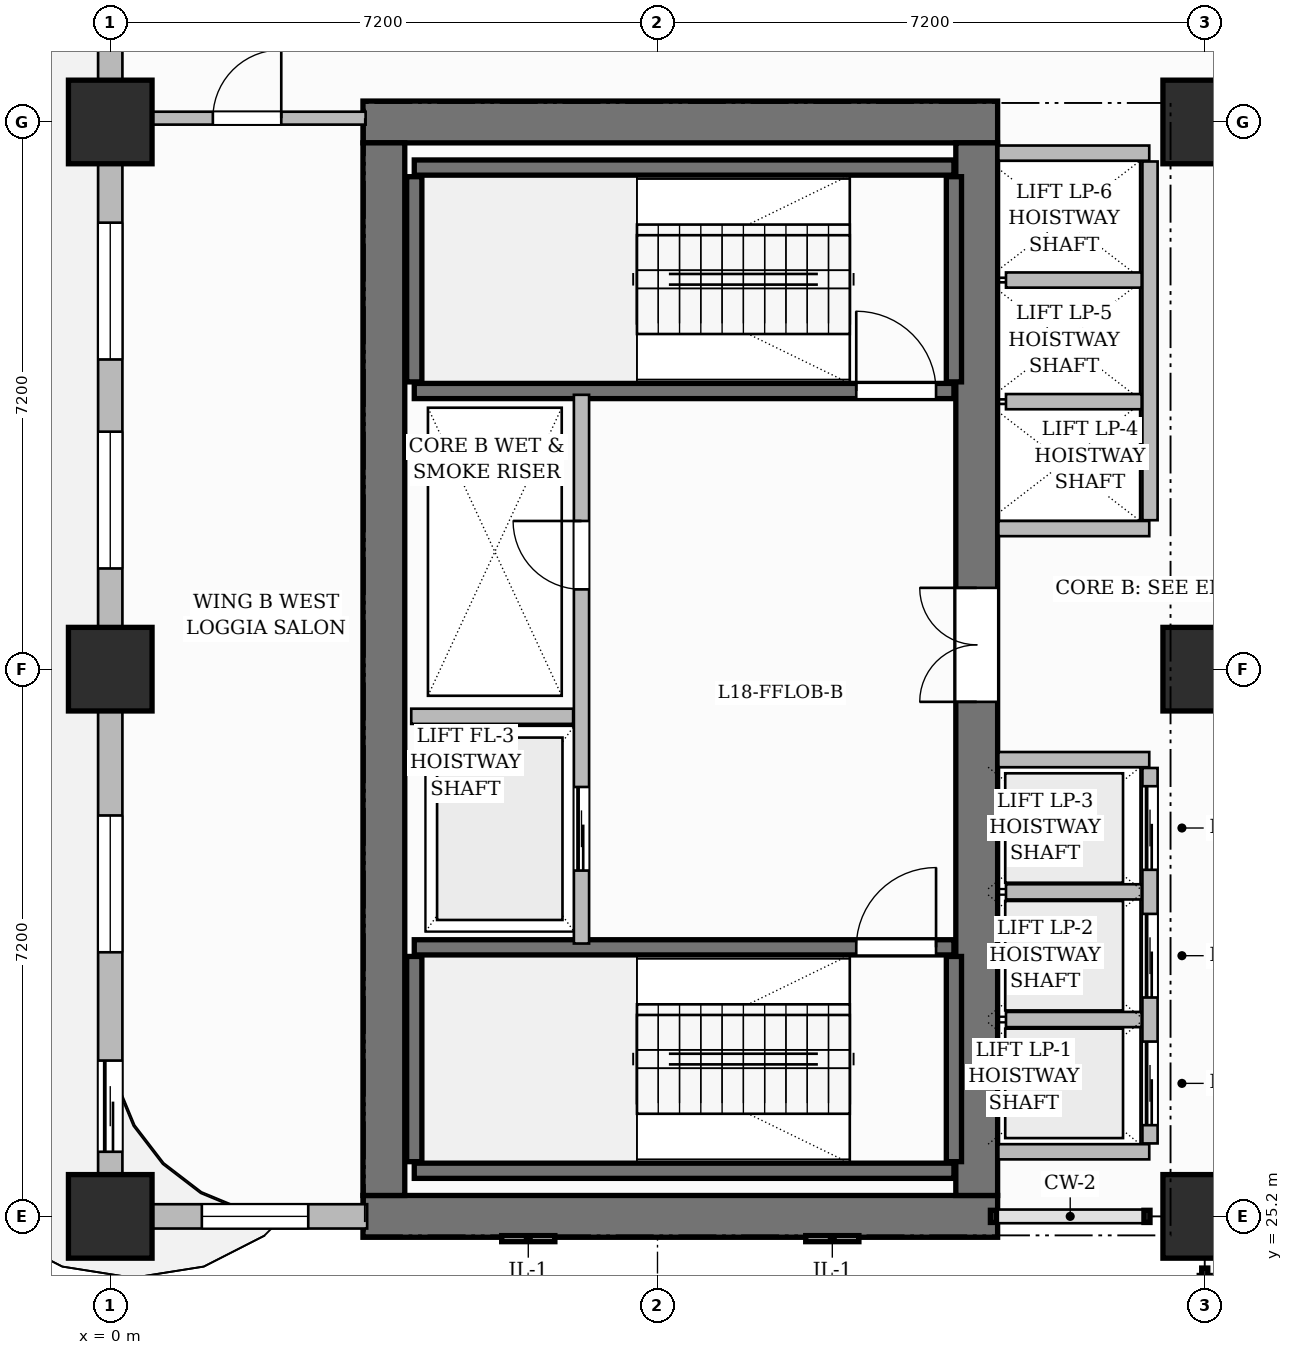
"""IFC4 building model, lengths in metres.
Left out: names, types, materials, properties, quantities, classifications, styles, units other than length and angle.
Written with IfcOpenShell. Run it as: python <this file> out.ifc"""

import sys

from ifc_helpers import new_model, si_unit, direction, frame, frame_2d, origin, origin_2d, place, context, subcontext, project, spatial, rectangle, extrude, source, transform, mapped, element, fill, save


model = new_model("IFC4")
c1 = context("Model", 3, precision=1e-05, world=origin(), true_north=direction((0.0, 1.0)))
c2 = subcontext(c1, "Body", "Model", "MODEL_VIEW")
j1 = project(units=[si_unit("LENGTHUNIT", "METRE"), si_unit("PLANEANGLEUNIT", "RADIAN")], contexts=[c1])
p1 = place(None, origin())
s1 = spatial("IfcSite", under=j1, at=p1, CompositionType="ELEMENT")
p2 = place(p1, origin())
s2 = spatial("IfcBuilding", under=s1, at=p2, CompositionType="ELEMENT")
p3 = place(p2, frame((0.0, 0.0, 76.8)))
s3 = spatial("IfcBuildingStorey", under=s2, at=p3, CompositionType="ELEMENT", Elevation=76.8)
for number, where, z_axis, x_axis in (
    (1, (3.325, 25.2, 0.0), (0.0, 0.0, 1.0), (1.0, 0.0, 0.0)),
    (2, (3.325, 39.6, 0.0), (0.0, 0.0, 1.0), (1.0, 0.0, 0.0)),
):
    element("IfcWall", number, at=place(p3, frame(where, z_axis=z_axis, x_axis=x_axis)), inside=s3, PredefinedType="SHEAR", context=c2, shape_type="SweptSolid", body=[
        extrude(rectangle(XDim=8.35, YDim=0.55, at=frame_2d((4.175, 0.0))), origin(), (0.0, 0.0, 1.0), 3.7),
    ])
p4 = place(p3, frame((3.6, 25.475, 0.0), z_axis=(0.0, 0.0, 1.0), x_axis=(0.0, 1.0, 0.0)))
e3 = element("IfcWall", 3, at=p4, inside=s3, PredefinedType="SHEAR", context=c2, shape_type="SweptSolid", body=[
    extrude(rectangle(XDim=13.85, YDim=0.55, at=frame_2d((6.925, 0.0))), origin(), (0.0, 0.0, 1.0), 3.7),
])
p5 = place(p3, frame((11.4, 25.475, 0.0), z_axis=(0.0, 0.0, 1.0), x_axis=(0.0, 1.0, 0.0)))
e4 = element("IfcWall", 4, at=p5, inside=s3, PredefinedType="SHEAR", context=c2, shape_type="SweptSolid", body=[
    extrude(rectangle(XDim=13.85, YDim=0.55, at=frame_2d((6.925, 0.0))), origin(), (0.0, 0.0, 1.0), 3.7),
])
p6 = place(p5, frame((6.495, 0.0, 0.0)))
e5 = element("IfcOpeningElement", 5, at=p6, cuts=e4, PredefinedType="OPENING", context=c2, shape_type="SweptSolid", body=[
    extrude(rectangle(XDim=1.5, YDim=2.2, at=frame_2d((0.75, 1.1))), frame((0.0, 0.285, 0.0), z_axis=(0.0, -1.0, 0.0), x_axis=(1.0, 0.0, 0.0)), (0.0, 0.0, 1.0), 0.57),
])
m1 = source(origin(), c2, "Body", "SweptSolid", [
    extrude(rectangle(XDim=1.1, YDim=1.1, at=origin_2d()), origin(), (0.0, 0.0, 1.0), 3.7),
])
for number, where, z_axis, x_axis in (
    (6, (0.0, 25.2, 0.0), (0.0, 0.0, 1.0), (1.0, 0.0, 0.0)),
    (7, (0.0, 32.4, 0.0), (0.0, 0.0, 1.0), (1.0, 0.0, 0.0)),
    (8, (0.0, 39.6, 0.0), (0.0, 0.0, 1.0), (1.0, 0.0, 0.0)),
    (9, (14.4, 25.2, 0.0), (0.0, 0.0, 1.0), (1.0, 0.0, 0.0)),
    (10, (14.4, 32.4, 0.0), (0.0, 0.0, 1.0), (1.0, 0.0, 0.0)),
    (11, (14.4, 39.6, 0.0), (0.0, 0.0, 1.0), (1.0, 0.0, 0.0)),
):
    element("IfcColumn", number, at=place(p3, frame(where, z_axis=z_axis, x_axis=x_axis)), inside=s3, PredefinedType="COLUMN", context=c2, shape_type="MappedRepresentation", body=[
        mapped(m1, transform((0.0, 0.0, 0.0), scale=1.0)),
    ])
p7 = place(p3, frame((4.0, 25.8, 0.0), z_axis=(0.0, 0.0, 1.0), x_axis=(1.0, 0.0, 0.0)))
e12 = element("IfcWall", 12, at=p7, inside=s3, PredefinedType="SHEAR", context=c2, shape_type="SweptSolid", body=[
    extrude(rectangle(XDim=7.1, YDim=0.2, at=frame_2d((3.55, 0.0))), origin(), (0.0, 0.0, 1.0), 3.7),
])
for number, where, z_axis, x_axis in (
    (13, (4.0, 25.92, 0.0), (0.0, 0.0, 1.0), (0.0, 1.0, 0.0)),
    (14, (11.1, 25.92, 0.0), (0.0, 0.0, 1.0), (0.0, 1.0, 0.0)),
):
    element("IfcWall", number, at=place(p3, frame(where, z_axis=z_axis, x_axis=x_axis)), inside=s3, PredefinedType="SHEAR", context=c2, shape_type="SweptSolid", body=[
        extrude(rectangle(XDim=2.7, YDim=0.2, at=frame_2d((1.35, 0.0))), origin(), (0.0, 0.0, 1.0), 3.7),
    ])
p8 = place(p3, frame((4.0, 28.74, 0.0), z_axis=(0.0, 0.0, 1.0), x_axis=(1.0, 0.0, 0.0)))
e15 = element("IfcWall", 15, at=p8, inside=s3, PredefinedType="SHEAR", context=c2, shape_type="SweptSolid", body=[
    extrude(rectangle(XDim=7.1, YDim=0.2, at=frame_2d((3.55, 0.0))), origin(), (0.0, 0.0, 1.0), 3.7),
])
p9 = place(p8, frame((5.815, 0.0, 0.0)))
e16 = element("IfcOpeningElement", 16, at=p9, cuts=e15, PredefinedType="OPENING", context=c2, shape_type="SweptSolid", body=[
    extrude(rectangle(XDim=1.05, YDim=2.2, at=frame_2d((0.525, 1.1))), frame((0.0, 0.11, 0.0), z_axis=(0.0, -1.0, 0.0), x_axis=(1.0, 0.0, 0.0)), (0.0, 0.0, 1.0), 0.22),
])
p10 = place(p3, frame((4.0, 39.0, 0.0), z_axis=(0.0, 0.0, 1.0), x_axis=(1.0, 0.0, 0.0)))
e17 = element("IfcWall", 17, at=p10, inside=s3, PredefinedType="SHEAR", context=c2, shape_type="SweptSolid", body=[
    extrude(rectangle(XDim=7.1, YDim=0.2, at=frame_2d((3.55, 0.0))), origin(), (0.0, 0.0, 1.0), 3.7),
])
for number, where, z_axis, x_axis in (
    (18, (4.0, 36.18, 0.0), (0.0, 0.0, 1.0), (0.0, 1.0, 0.0)),
    (19, (11.1, 36.18, 0.0), (0.0, 0.0, 1.0), (0.0, 1.0, 0.0)),
):
    element("IfcWall", number, at=place(p3, frame(where, z_axis=z_axis, x_axis=x_axis)), inside=s3, PredefinedType="SHEAR", context=c2, shape_type="SweptSolid", body=[
        extrude(rectangle(XDim=2.7, YDim=0.2, at=frame_2d((1.35, 0.0))), origin(), (0.0, 0.0, 1.0), 3.7),
    ])
p11 = place(p3, frame((4.0, 36.06, 0.0), z_axis=(0.0, 0.0, 1.0), x_axis=(1.0, 0.0, 0.0)))
e20 = element("IfcWall", 20, at=p11, inside=s3, PredefinedType="SHEAR", context=c2, shape_type="SweptSolid", body=[
    extrude(rectangle(XDim=7.1, YDim=0.2, at=frame_2d((3.55, 0.0))), origin(), (0.0, 0.0, 1.0), 3.7),
])
p12 = place(p11, frame((5.815, 0.0, 0.0)))
e21 = element("IfcOpeningElement", 21, at=p12, cuts=e20, PredefinedType="OPENING", context=c2, shape_type="SweptSolid", body=[
    extrude(rectangle(XDim=1.05, YDim=2.2, at=frame_2d((0.525, 1.1))), frame((0.0, 0.11, 0.0), z_axis=(0.0, -1.0, 0.0), x_axis=(1.0, 0.0, 0.0)), (0.0, 0.0, 1.0), 0.22),
])
p13 = place(p3, frame((6.2, 28.79, 0.0), z_axis=(0.0, 0.0, 1.0), x_axis=(0.0, 1.0, 0.0)))
e22 = element("IfcWall", 22, at=p13, inside=s3, PredefinedType="PARTITIONING", context=c2, shape_type="SweptSolid", body=[
    extrude(rectangle(XDim=7.22, YDim=0.2, at=frame_2d((3.61, 0.0))), origin(), (0.0, 0.0, 1.0), 3.45),
])
p14 = place(p13, frame((4.66, 0.0, 0.0)))
e23 = element("IfcOpeningElement", 23, at=p14, cuts=e22, PredefinedType="OPENING", context=c2, shape_type="SweptSolid", body=[
    extrude(rectangle(XDim=0.9, YDim=2.1, at=frame_2d((0.45, 1.05))), frame((0.0, 0.11, 0.0), z_axis=(0.0, -1.0, 0.0), x_axis=(1.0, 0.0, 0.0)), (0.0, 0.0, 1.0), 0.22),
])
p15 = place(p13, frame((0.96, 0.0, 0.0)))
e24 = element("IfcOpeningElement", 24, at=p15, cuts=e22, PredefinedType="OPENING", context=c2, shape_type="SweptSolid", body=[
    extrude(rectangle(XDim=1.1, YDim=2.2, at=frame_2d((0.55, 1.1))), frame((0.0, 0.11, 0.0), z_axis=(0.0, -1.0, 0.0), x_axis=(1.0, 0.0, 0.0)), (0.0, 0.0, 1.0), 0.22),
])
p16 = place(p3, frame((3.96, 31.78, 0.0), z_axis=(0.0, 0.0, 1.0), x_axis=(1.0, 0.0, 0.0)))
e25 = element("IfcWall", 25, at=p16, inside=s3, PredefinedType="PARTITIONING", context=c2, shape_type="SweptSolid", body=[
    extrude(rectangle(XDim=2.13, YDim=0.2, at=frame_2d((1.065, 0.0))), origin(), (0.0, 0.0, 1.0), 3.45),
])
for number, where, z_axis, x_axis in (
    (26, (11.685, 26.05, 0.0), (0.0, 0.0, 1.0), (1.0, 0.0, 0.0)),
    (27, (11.685, 31.21, 0.0), (0.0, 0.0, 1.0), (1.0, 0.0, 0.0)),
):
    element("IfcWall", number, at=place(p3, frame(where, z_axis=z_axis, x_axis=x_axis)), inside=s3, PredefinedType="PARTITIONING", context=c2, shape_type="SweptSolid", body=[
        extrude(rectangle(XDim=1.985, YDim=0.2, at=frame_2d((0.992, 0.0))), origin(), (0.0, 0.0, 1.0), 3.45),
    ])
p17 = place(p3, frame((13.68, 26.16, 0.0), z_axis=(0.0, 0.0, 1.0), x_axis=(0.0, 1.0, 0.0)))
e28 = element("IfcWall", 28, at=p17, inside=s3, PredefinedType="PARTITIONING", context=c2, shape_type="SweptSolid", body=[
    extrude(rectangle(XDim=4.94, YDim=0.2, at=frame_2d((2.47, 0.0))), origin(), (0.0, 0.0, 1.0), 3.45),
])
p18 = place(p17, frame((0.24, 0.0, 0.0)))
e29 = element("IfcOpeningElement", 29, at=p18, cuts=e28, PredefinedType="OPENING", context=c2, shape_type="SweptSolid", body=[
    extrude(rectangle(XDim=1.1, YDim=2.2, at=frame_2d((0.55, 1.1))), frame((0.0, 0.11, 0.0), z_axis=(0.0, -1.0, 0.0), x_axis=(1.0, 0.0, 0.0)), (0.0, 0.0, 1.0), 0.22),
])
p19 = place(p17, frame((1.92, 0.0, 0.0)))
e30 = element("IfcOpeningElement", 30, at=p19, cuts=e28, PredefinedType="OPENING", context=c2, shape_type="SweptSolid", body=[
    extrude(rectangle(XDim=1.1, YDim=2.2, at=frame_2d((0.55, 1.1))), frame((0.0, 0.11, 0.0), z_axis=(0.0, -1.0, 0.0), x_axis=(1.0, 0.0, 0.0)), (0.0, 0.0, 1.0), 0.22),
])
p20 = place(p17, frame((3.6, 0.0, 0.0)))
e31 = element("IfcOpeningElement", 31, at=p20, cuts=e28, PredefinedType="OPENING", context=c2, shape_type="SweptSolid", body=[
    extrude(rectangle(XDim=1.1, YDim=2.2, at=frame_2d((0.55, 1.1))), frame((0.0, 0.11, 0.0), z_axis=(0.0, -1.0, 0.0), x_axis=(1.0, 0.0, 0.0)), (0.0, 0.0, 1.0), 0.22),
])
for number, where, z_axis, x_axis in (
    (32, (11.785, 27.79, 0.0), (0.0, 0.0, 1.0), (1.0, 0.0, 0.0)),
    (33, (11.785, 29.47, 0.0), (0.0, 0.0, 1.0), (1.0, 0.0, 0.0)),
):
    element("IfcWall", number, at=place(p3, frame(where, z_axis=z_axis, x_axis=x_axis)), inside=s3, PredefinedType="PARTITIONING", context=c2, shape_type="SweptSolid", body=[
        extrude(rectangle(XDim=1.785, YDim=0.2, at=frame_2d((0.893, 0.0))), origin(), (0.0, 0.0, 1.0), 3.45),
    ])
for number, where, z_axis, x_axis in (
    (34, (11.685, 34.25, 0.0), (0.0, 0.0, 1.0), (1.0, 0.0, 0.0)),
    (35, (11.685, 39.19, 0.0), (0.0, 0.0, 1.0), (1.0, 0.0, 0.0)),
):
    element("IfcWall", number, at=place(p3, frame(where, z_axis=z_axis, x_axis=x_axis)), inside=s3, PredefinedType="PARTITIONING", context=c2, shape_type="SweptSolid", body=[
        extrude(rectangle(XDim=1.985, YDim=0.2, at=frame_2d((0.992, 0.0))), origin(), (0.0, 0.0, 1.0), 3.45),
    ])
p21 = place(p3, frame((13.68, 34.36, 0.0), z_axis=(0.0, 0.0, 1.0), x_axis=(0.0, 1.0, 0.0)))
e36 = element("IfcWall", 36, at=p21, inside=s3, PredefinedType="PARTITIONING", context=c2, shape_type="SweptSolid", body=[
    extrude(rectangle(XDim=4.72, YDim=0.2, at=frame_2d((2.36, 0.0))), origin(), (0.0, 0.0, 1.0), 3.45),
])
for number, where, z_axis, x_axis in (
    (37, (11.785, 35.92, 0.0), (0.0, 0.0, 1.0), (1.0, 0.0, 0.0)),
    (38, (11.785, 37.52, 0.0), (0.0, 0.0, 1.0), (1.0, 0.0, 0.0)),
):
    element("IfcWall", number, at=place(p3, frame(where, z_axis=z_axis, x_axis=x_axis)), inside=s3, PredefinedType="PARTITIONING", context=c2, shape_type="SweptSolid", body=[
        extrude(rectangle(XDim=1.785, YDim=0.2, at=frame_2d((0.893, 0.0))), origin(), (0.0, 0.0, 1.0), 3.45),
    ])
p22 = place(p3, frame((0.24, 39.65, 0.0), z_axis=(0.0, 0.0, 1.0), x_axis=(1.0, 0.0, 0.0)))
e39 = element("IfcWall", 39, at=p22, inside=s3, PredefinedType="PARTITIONING", context=c2, shape_type="SweptSolid", body=[
    extrude(rectangle(XDim=3.12, YDim=0.17, at=frame_2d((1.56, 0.0))), origin(), (0.0, 0.0, 1.0), 3.45),
])
p23 = place(p22, frame((1.11, 0.0, 0.0)))
e40 = element("IfcOpeningElement", 40, at=p23, cuts=e39, PredefinedType="OPENING", context=c2, shape_type="SweptSolid", body=[
    extrude(rectangle(XDim=0.9, YDim=2.15, at=frame_2d((0.45, 1.075))), frame((0.0, 0.095, 0.0), z_axis=(0.0, -1.0, 0.0), x_axis=(1.0, 0.0, 0.0)), (0.0, 0.0, 1.0), 0.19),
])
p24 = place(p3, frame((0.0, 25.2, 0.0), z_axis=(0.0, 0.0, 1.0), x_axis=(1.0, 0.0, 0.0)))
e41 = element("IfcWall", 41, at=p24, inside=s3, PredefinedType="SOLIDWALL", context=c2, shape_type="SweptSolid", body=[
    extrude(rectangle(XDim=3.38, YDim=0.32, at=frame_2d((1.69, 0.0))), origin(), (0.0, 0.0, 1.0), 3.45),
])
p25 = place(p24, frame((1.205, 0.0, 0.8)))
e42 = element("IfcOpeningElement", 42, at=p25, cuts=e41, PredefinedType="OPENING", context=c2, shape_type="SweptSolid", body=[
    extrude(rectangle(XDim=1.4, YDim=1.85, at=frame_2d((0.7, 0.925))), frame((0.0, 0.17, 0.0), z_axis=(0.0, -1.0, 0.0), x_axis=(1.0, 0.0, 0.0)), (0.0, 0.0, 1.0), 0.34),
])
p26 = place(p3, frame((0.0, 25.25, 0.0), z_axis=(0.0, 0.0, 1.0), x_axis=(0.0, 1.0, 0.0)))
e43 = element("IfcWall", 43, at=p26, inside=s3, PredefinedType="SOLIDWALL", context=c2, shape_type="SweptSolid", body=[
    extrude(rectangle(XDim=21.5, YDim=0.32, at=frame_2d((10.75, 0.0))), origin(), (0.0, 0.0, 1.0), 2.885),
])
p27 = place(p26, frame((18.357, 0.0, 0.0)))
e44 = element("IfcOpeningElement", 44, at=p27, cuts=e43, PredefinedType="OPENING", context=c2, shape_type="SweptSolid", body=[
    extrude(rectangle(XDim=1.2, YDim=2.2, at=frame_2d((0.6, 1.1))), frame((0.0, 0.17, 0.0), z_axis=(0.0, -1.0, 0.0), x_axis=(1.0, 0.0, 0.0)), (0.0, 0.0, 1.0), 0.34),
])
p28 = place(p26, frame((0.8, 0.0, 0.0)))
e45 = element("IfcOpeningElement", 45, at=p28, cuts=e43, PredefinedType="OPENING", context=c2, shape_type="SweptSolid", body=[
    extrude(rectangle(XDim=1.2, YDim=2.2, at=frame_2d((0.6, 1.1))), frame((0.0, 0.17, 0.0), z_axis=(0.0, -1.0, 0.0), x_axis=(1.0, 0.0, 0.0)), (0.0, 0.0, 1.0), 0.34),
])
p29 = place(p26, frame((3.425, 0.0, 0.8)))
e46 = element("IfcOpeningElement", 46, at=p29, cuts=e43, PredefinedType="OPENING", context=c2, shape_type="SweptSolid", body=[
    extrude(rectangle(XDim=1.8, YDim=1.85, at=frame_2d((0.9, 0.925))), frame((0.0, 0.17, 0.0), z_axis=(0.0, -1.0, 0.0), x_axis=(1.0, 0.0, 0.0)), (0.0, 0.0, 1.0), 0.34),
])
p30 = place(p26, frame((8.475, 0.0, 0.8)))
e47 = element("IfcOpeningElement", 47, at=p30, cuts=e43, PredefinedType="OPENING", context=c2, shape_type="SweptSolid", body=[
    extrude(rectangle(XDim=1.8, YDim=1.85, at=frame_2d((0.9, 0.925))), frame((0.0, 0.17, 0.0), z_axis=(0.0, -1.0, 0.0), x_axis=(1.0, 0.0, 0.0)), (0.0, 0.0, 1.0), 0.34),
])
p31 = place(p26, frame((11.225, 0.0, 0.8)))
e48 = element("IfcOpeningElement", 48, at=p31, cuts=e43, PredefinedType="OPENING", context=c2, shape_type="SweptSolid", body=[
    extrude(rectangle(XDim=1.8, YDim=1.85, at=frame_2d((0.9, 0.925))), frame((0.0, 0.17, 0.0), z_axis=(0.0, -1.0, 0.0), x_axis=(1.0, 0.0, 0.0)), (0.0, 0.0, 1.0), 0.34),
])
p32 = place(p26, frame((16.632, 0.0, 0.8)))
e49 = element("IfcOpeningElement", 49, at=p32, cuts=e43, PredefinedType="OPENING", context=c2, shape_type="SweptSolid", body=[
    extrude(rectangle(XDim=1.15, YDim=1.8, at=frame_2d((0.575, 0.9))), frame((0.0, 0.17, 0.0), z_axis=(0.0, -1.0, 0.0), x_axis=(1.0, 0.0, 0.0)), (0.0, 0.0, 1.0), 0.34),
])
m2 = source(origin(), c2, "Body", "SweptSolid", [
    extrude(rectangle(XDim=1.05, YDim=2.2, at=frame_2d((0.525, 1.1))), frame((0.0, 0.025, 0.0), z_axis=(0.0, -1.0, 0.0), x_axis=(1.0, 0.0, 0.0)), (0.0, 0.0, 1.0), 0.05),
])
p33 = place(p9, origin())
e50 = element("IfcDoor", 50, at=p33, inside=s3, OperationType="SINGLE_SWING_RIGHT", PredefinedType="DOOR", context=c2, shape_type="MappedRepresentation", body=[
    mapped(m2, transform((0.0, 0.0, 0.0), scale=1.0)),
])
fill(e16, e50)
p34 = place(p12, origin())
e51 = element("IfcDoor", 51, at=p34, inside=s3, OperationType="SINGLE_SWING_LEFT", PredefinedType="DOOR", context=c2, shape_type="MappedRepresentation", body=[
    mapped(m2, transform((0.0, 0.0, 0.0), scale=1.0)),
])
fill(e21, e51)
m3 = source(origin(), c2, "Body", "SweptSolid", [
    extrude(rectangle(XDim=0.9, YDim=2.1, at=frame_2d((0.45, 1.05))), frame((0.0, 0.025, 0.0), z_axis=(0.0, -1.0, 0.0), x_axis=(1.0, 0.0, 0.0)), (0.0, 0.0, 1.0), 0.05),
])
p35 = place(p14, origin())
e52 = element("IfcDoor", 52, at=p35, inside=s3, OperationType="SINGLE_SWING_RIGHT", PredefinedType="DOOR", context=c2, shape_type="MappedRepresentation", body=[
    mapped(m3, transform((0.0, 0.0, 0.0), scale=1.0)),
])
fill(e23, e52)
m4 = source(origin(), c2, "Body", "SweptSolid", [
    extrude(rectangle(XDim=1.5, YDim=2.2, at=frame_2d((0.75, 1.1))), frame((0.0, 0.025, 0.0), z_axis=(0.0, -1.0, 0.0), x_axis=(1.0, 0.0, 0.0)), (0.0, 0.0, 1.0), 0.05),
])
p36 = place(p6, origin())
e53 = element("IfcDoor", 53, at=p36, inside=s3, OperationType="DOUBLE_DOOR_SINGLE_SWING", PredefinedType="DOOR", context=c2, shape_type="MappedRepresentation", body=[
    mapped(m4, transform((0.0, 0.0, 0.0), scale=1.0)),
])
fill(e5, e53)
m5 = source(origin(), c2, "Body", "SweptSolid", [
    extrude(rectangle(XDim=0.9, YDim=2.15, at=frame_2d((0.45, 1.075))), frame((0.0, 0.025, 0.0), z_axis=(0.0, -1.0, 0.0), x_axis=(1.0, 0.0, 0.0)), (0.0, 0.0, 1.0), 0.05),
])
p37 = place(p23, origin())
e54 = element("IfcDoor", 54, at=p37, inside=s3, OperationType="SINGLE_SWING_RIGHT", PredefinedType="DOOR", context=c2, shape_type="MappedRepresentation", body=[
    mapped(m5, transform((0.0, 0.0, 0.0), scale=1.0)),
])
fill(e40, e54)
m6 = source(origin(), c2, "Body", "SweptSolid", [
    extrude(rectangle(XDim=1.1, YDim=2.2, at=frame_2d((0.55, 1.1))), frame((0.0, 0.025, 0.0), z_axis=(0.0, -1.0, 0.0), x_axis=(1.0, 0.0, 0.0)), (0.0, 0.0, 1.0), 0.05),
])
p38 = place(p15, origin())
e55 = element("IfcDoor", 55, at=p38, inside=s3, OperationType="SLIDING_TO_LEFT", PredefinedType="DOOR", context=c2, shape_type="MappedRepresentation", body=[
    mapped(m6, transform((0.0, 0.0, 0.0), scale=1.0)),
])
fill(e24, e55)
p39 = place(p18, origin())
e56 = element("IfcDoor", 56, at=p39, inside=s3, OperationType="SLIDING_TO_LEFT", PredefinedType="DOOR", context=c2, shape_type="MappedRepresentation", body=[
    mapped(m6, transform((0.0, 0.0, 0.0), scale=1.0)),
])
fill(e29, e56)
p40 = place(p19, origin())
e57 = element("IfcDoor", 57, at=p40, inside=s3, OperationType="SLIDING_TO_LEFT", PredefinedType="DOOR", context=c2, shape_type="MappedRepresentation", body=[
    mapped(m6, transform((0.0, 0.0, 0.0), scale=1.0)),
])
fill(e30, e57)
p41 = place(p20, origin())
e58 = element("IfcDoor", 58, at=p41, inside=s3, OperationType="SLIDING_TO_LEFT", PredefinedType="DOOR", context=c2, shape_type="MappedRepresentation", body=[
    mapped(m6, transform((0.0, 0.0, 0.0), scale=1.0)),
])
fill(e31, e58)
m7 = source(origin(), c2, "Body", "SweptSolid", [
    extrude(rectangle(XDim=1.2, YDim=2.2, at=frame_2d((0.6, 1.1))), frame((0.0, 0.025, 0.0), z_axis=(0.0, -1.0, 0.0), x_axis=(1.0, 0.0, 0.0)), (0.0, 0.0, 1.0), 0.05),
])
p42 = place(p28, origin())
e59 = element("IfcDoor", 59, at=p42, inside=s3, OperationType="SLIDING_TO_LEFT", PredefinedType="DOOR", context=c2, shape_type="MappedRepresentation", body=[
    mapped(m7, transform((0.0, 0.0, 0.0), scale=1.0)),
])
fill(e45, e59)
m8 = source(origin(), c2, "Body", "SweptSolid", [
    extrude(rectangle(XDim=1.4, YDim=1.85, at=frame_2d((0.7, 0.925))), frame((0.0, 0.03, 0.0), z_axis=(0.0, -1.0, 0.0), x_axis=(1.0, 0.0, 0.0)), (0.0, 0.0, 1.0), 0.06),
])
p43 = place(p25, origin())
e60 = element("IfcWindow", 60, at=p43, inside=s3, PartitioningType="SINGLE_PANEL", PredefinedType="WINDOW", context=c2, shape_type="MappedRepresentation", body=[
    mapped(m8, transform((0.0, 0.0, 0.0), scale=1.0)),
])
fill(e42, e60)
m9 = source(origin(), c2, "Body", "SweptSolid", [
    extrude(rectangle(XDim=1.8, YDim=1.85, at=frame_2d((0.9, 0.925))), frame((0.0, 0.03, 0.0), z_axis=(0.0, -1.0, 0.0), x_axis=(1.0, 0.0, 0.0)), (0.0, 0.0, 1.0), 0.06),
])
p44 = place(p29, origin())
e61 = element("IfcWindow", 61, at=p44, inside=s3, PartitioningType="DOUBLE_PANEL_VERTICAL", PredefinedType="WINDOW", context=c2, shape_type="MappedRepresentation", body=[
    mapped(m9, transform((0.0, 0.0, 0.0), scale=1.0)),
])
fill(e46, e61)
p45 = place(p30, origin())
e62 = element("IfcWindow", 62, at=p45, inside=s3, PartitioningType="DOUBLE_PANEL_VERTICAL", PredefinedType="WINDOW", context=c2, shape_type="MappedRepresentation", body=[
    mapped(m9, transform((0.0, 0.0, 0.0), scale=1.0)),
])
fill(e47, e62)
p46 = place(p31, origin())
e63 = element("IfcWindow", 63, at=p46, inside=s3, PartitioningType="DOUBLE_PANEL_VERTICAL", PredefinedType="WINDOW", context=c2, shape_type="MappedRepresentation", body=[
    mapped(m9, transform((0.0, 0.0, 0.0), scale=1.0)),
])
fill(e48, e63)
save(model, sys.argv[1])
